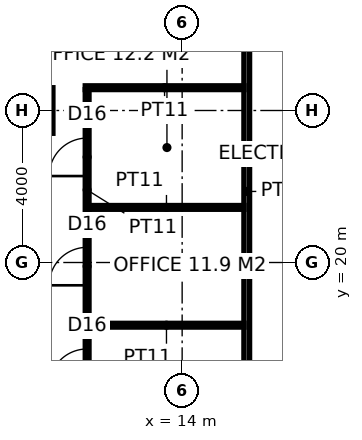
"""IFC4 building model, lengths in metres.
Left out: names, types, materials, properties, quantities, classifications, styles, units other than length and angle.
Written with IfcOpenShell. Run it as: python <this file> out.ifc"""

import sys

from ifc_helpers import new_model, si_unit, direction, frame, frame_2d, origin, origin_2d, place, context, subcontext, project, spatial, rectangle, hollow_rectangle, extrude, element, fill, save


model = new_model("IFC4")
c1 = context("Model", 3, precision=1e-05, world=origin(), true_north=direction((0.0, 1.0)))
c2 = subcontext(c1, "Body", "Model", "MODEL_VIEW")
j1 = project(units=[si_unit("LENGTHUNIT", "METRE"), si_unit("PLANEANGLEUNIT", "RADIAN")], contexts=[c1])
p1 = place(None, origin())
s1 = spatial("IfcSite", under=j1, at=p1, CompositionType="ELEMENT")
p2 = place(p1, origin())
s2 = spatial("IfcBuilding", under=s1, at=p2, CompositionType="ELEMENT")
p3 = place(p2, frame((0.0, 0.0, 39.0)))
s3 = spatial("IfcBuildingStorey", under=s2, at=p3, CompositionType="ELEMENT", Elevation=39.0)
p4 = place(p3, frame((10.0, 24.0, 0.0), z_axis=(0.0, 0.0, 1.0), x_axis=(1.0, 0.0, 0.0)))
e1 = element("IfcColumn", 1, at=p4, inside=s3, PredefinedType="COLUMN", context=c2, shape_type="SweptSolid", body=[
    extrude(hollow_rectangle(XDim=1.2, YDim=1.2, WallThickness=0.125, at=origin_2d()), origin(), (0.0, 0.0, 1.0), 4.0),
])
p5 = place(p3, frame((15.7, 14.625, 0.0), z_axis=(0.0, 0.0, 1.0), x_axis=(0.0, 1.0, 0.0)))
e2 = element("IfcWall", 2, at=p5, inside=s3, PredefinedType="PARTITIONING", context=c2, shape_type="SweptSolid", body=[
    extrude(rectangle(XDim=24.15, YDim=0.15, at=frame_2d((12.075, 0.0))), origin(), (0.0, 0.0, 1.0), 3.85),
])
p6 = place(p5, frame((11.175, 0.0, 0.0)))
e3 = element("IfcOpeningElement", 3, at=p6, cuts=e2, PredefinedType="OPENING", context=c2, shape_type="SweptSolid", body=[
    extrude(rectangle(XDim=1.8, YDim=2.4, at=frame_2d((0.9, 1.2))), frame((0.0, 0.085, 0.0), z_axis=(0.0, -1.0, 0.0), x_axis=(1.0, 0.0, 0.0)), (0.0, 0.0, 1.0), 0.17),
])
for number, where, z_axis, x_axis in (
    (4, (11.55, 18.35, 0.0), (0.0, 0.0, 1.0), (1.0, 0.0, 0.0)),
    (5, (11.55, 21.45, 0.0), (0.0, 0.0, 1.0), (1.0, 0.0, 0.0)),
):
    element("IfcWall", number, at=place(p3, frame(where, z_axis=z_axis, x_axis=x_axis)), inside=s3, PredefinedType="PARTITIONING", context=c2, shape_type="SweptSolid", body=[
        extrude(rectangle(XDim=4.075, YDim=0.1, at=frame_2d((2.038, 0.0))), origin(), (0.0, 0.0, 1.0), 3.85),
    ])
p7 = place(p3, frame((11.45, 24.6, 0.0), z_axis=(0.0, 0.0, 1.0), x_axis=(1.0, 0.0, 0.0)))
e6 = element("IfcWall", 6, at=p7, inside=s3, PredefinedType="PARTITIONING", context=c2, shape_type="SweptSolid", body=[
    extrude(rectangle(XDim=4.175, YDim=0.1, at=frame_2d((2.087, 0.0))), origin(), (0.0, 0.0, 1.0), 2.65),
])
p8 = place(p3, frame((11.5, 15.75, 0.0), z_axis=(0.0, 0.0, 1.0), x_axis=(0.0, 1.0, 0.0)))
e7 = element("IfcWall", 7, at=p8, inside=s3, PredefinedType="PARTITIONING", context=c2, shape_type="SweptSolid", body=[
    extrude(rectangle(XDim=8.8, YDim=0.1, at=frame_2d((4.4, 0.0))), origin(), (0.0, 0.0, 1.0), 3.85),
])
p9 = place(p8, frame((0.975, 0.0, 0.0)))
e8 = element("IfcOpeningElement", 8, at=p9, cuts=e7, PredefinedType="OPENING", context=c2, shape_type="SweptSolid", body=[
    extrude(rectangle(XDim=1.0, YDim=2.2, at=frame_2d((0.5, 1.1))), frame((0.0, 0.06, 0.0), z_axis=(0.0, -1.0, 0.0), x_axis=(1.0, 0.0, 0.0)), (0.0, 0.0, 1.0), 0.12),
])
p10 = place(p8, frame((3.65, 0.0, 0.0)))
e9 = element("IfcOpeningElement", 9, at=p10, cuts=e7, PredefinedType="OPENING", context=c2, shape_type="SweptSolid", body=[
    extrude(rectangle(XDim=1.0, YDim=2.2, at=frame_2d((0.5, 1.1))), frame((0.0, 0.06, 0.0), z_axis=(0.0, -1.0, 0.0), x_axis=(1.0, 0.0, 0.0)), (0.0, 0.0, 1.0), 0.12),
])
p11 = place(p8, frame((6.525, 0.0, 0.0)))
e10 = element("IfcOpeningElement", 10, at=p11, cuts=e7, PredefinedType="OPENING", context=c2, shape_type="SweptSolid", body=[
    extrude(rectangle(XDim=1.0, YDim=2.2, at=frame_2d((0.5, 1.1))), frame((0.0, 0.06, 0.0), z_axis=(0.0, -1.0, 0.0), x_axis=(1.0, 0.0, 0.0)), (0.0, 0.0, 1.0), 0.12),
])
p12 = place(p9, origin())
e11 = element("IfcDoor", 11, at=p12, inside=s3, OperationType="SINGLE_SWING_LEFT", PredefinedType="DOOR", context=c2, shape_type="SweptSolid", body=[
    extrude(rectangle(XDim=1.0, YDim=2.2, at=frame_2d((0.5, 1.1))), frame((0.0, 0.025, 0.0), z_axis=(0.0, -1.0, 0.0), x_axis=(1.0, 0.0, 0.0)), (0.0, 0.0, 1.0), 0.05),
])
fill(e8, e11)
p13 = place(p10, origin())
e12 = element("IfcDoor", 12, at=p13, inside=s3, OperationType="SINGLE_SWING_LEFT", PredefinedType="DOOR", context=c2, shape_type="SweptSolid", body=[
    extrude(rectangle(XDim=1.0, YDim=2.2, at=frame_2d((0.5, 1.1))), frame((0.0, 0.025, 0.0), z_axis=(0.0, -1.0, 0.0), x_axis=(1.0, 0.0, 0.0)), (0.0, 0.0, 1.0), 0.05),
])
fill(e9, e12)
p14 = place(p11, origin())
e13 = element("IfcDoor", 13, at=p14, inside=s3, OperationType="SINGLE_SWING_LEFT", PredefinedType="DOOR", context=c2, shape_type="SweptSolid", body=[
    extrude(rectangle(XDim=1.0, YDim=2.2, at=frame_2d((0.5, 1.1))), frame((0.0, 0.025, 0.0), z_axis=(0.0, -1.0, 0.0), x_axis=(1.0, 0.0, 0.0)), (0.0, 0.0, 1.0), 0.05),
])
fill(e10, e13)
save(model, sys.argv[1])
